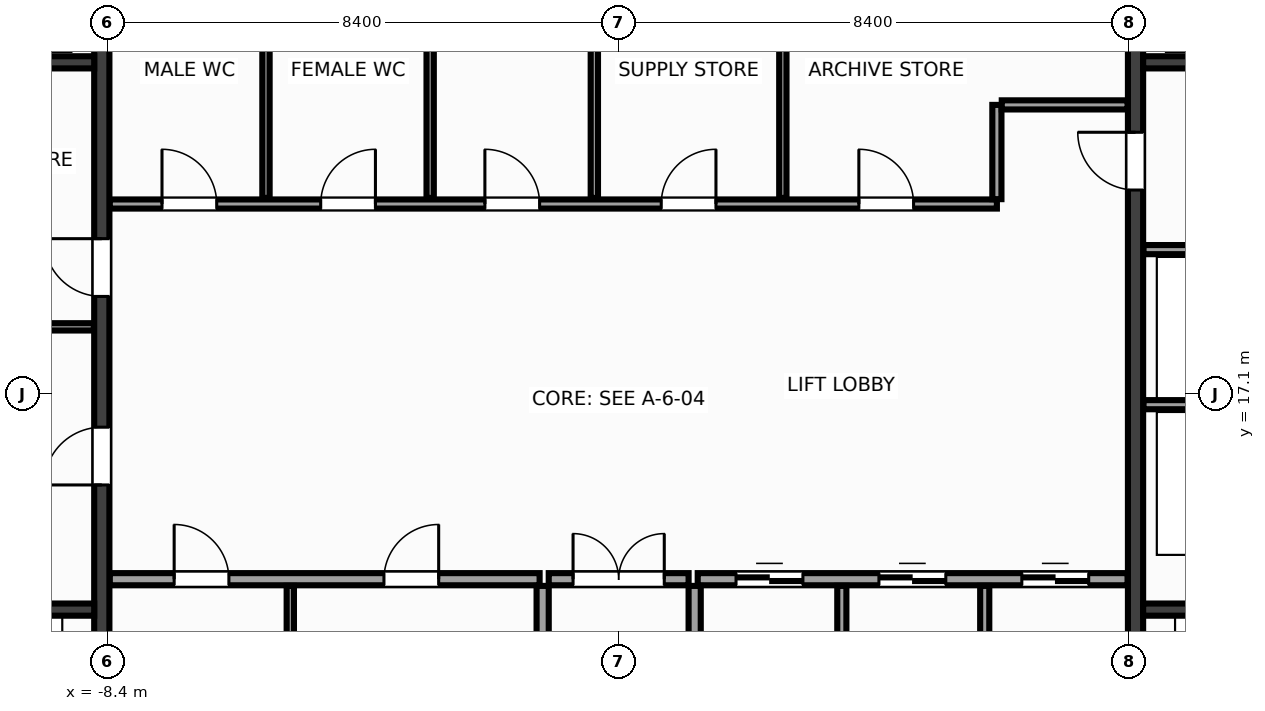
"""IFC4 building model, lengths in metres.
Left out: names, types, materials, properties, quantities, classifications, styles, units other than length and angle.
Written with IfcOpenShell. Run it as: python <this file> out.ifc"""

import sys

from ifc_helpers import new_model, si_unit, direction, frame, frame_2d, origin, place, context, subcontext, project, spatial, rectangle, extrude, source, transform, mapped, element, fill, save


model = new_model("IFC4")
c1 = context("Model", 3, precision=1e-05, world=origin(), true_north=direction((0.0, 1.0)))
c2 = subcontext(c1, "Body", "Model", "MODEL_VIEW")
j1 = project(units=[si_unit("LENGTHUNIT", "METRE"), si_unit("PLANEANGLEUNIT", "RADIAN")], contexts=[c1])
p1 = place(None, origin())
s1 = spatial("IfcSite", under=j1, at=p1, CompositionType="ELEMENT")
p2 = place(p1, origin())
s2 = spatial("IfcBuilding", under=s1, at=p2, CompositionType="ELEMENT")
p3 = place(p2, frame((0.0, 0.0, 95.6)))
s3 = spatial("IfcBuildingStorey", under=s2, at=p3, CompositionType="ELEMENT", Elevation=95.6)
m1 = source(origin(), c2, "Body", "SweptSolid", [
    extrude(rectangle(XDim=12.95, YDim=0.25, at=frame_2d((6.475, 0.0))), origin(), (0.0, 0.0, 1.0), 3.6),
])
p4 = place(p3, frame((-8.5, 10.525, 0.0), z_axis=(0.0, 0.0, 1.0), x_axis=(0.0, 1.0, 0.0)))
e1 = element("IfcWall", 1, at=p4, inside=s3, PredefinedType="SHEAR", context=c2, shape_type="MappedRepresentation", body=[
    mapped(m1, transform((0.0, 0.0, 0.0), x_axis=(1.0, 0.0, 0.0), y_axis=(0.0, 1.0, 0.0), z_axis=(0.0, 0.0, 1.0), scale=1.0)),
])
p5 = place(p4, frame((5.075, 0.0, 0.0)))
e2 = element("IfcOpeningElement", 2, at=p5, cuts=e1, PredefinedType="OPENING", context=c2, shape_type="SweptSolid", body=[
    extrude(rectangle(XDim=0.95, YDim=2.15, at=frame_2d((0.475, 1.075))), frame((0.0, 0.137, 0.0), z_axis=(0.0, -1.0, 0.0), x_axis=(1.0, 0.0, 0.0)), (0.0, 0.0, 1.0), 0.274),
])
p6 = place(p4, frame((8.175, 0.0, 0.0)))
e3 = element("IfcOpeningElement", 3, at=p6, cuts=e1, PredefinedType="OPENING", context=c2, shape_type="SweptSolid", body=[
    extrude(rectangle(XDim=0.95, YDim=2.15, at=frame_2d((0.475, 1.075))), frame((0.0, 0.137, 0.0), z_axis=(0.0, -1.0, 0.0), x_axis=(1.0, 0.0, 0.0)), (0.0, 0.0, 1.0), 0.274),
])
p7 = place(p3, frame((8.5, 10.525, 0.0), z_axis=(0.0, 0.0, 1.0), x_axis=(0.0, 1.0, 0.0)))
e4 = element("IfcWall", 4, at=p7, inside=s3, PredefinedType="SHEAR", context=c2, shape_type="MappedRepresentation", body=[
    mapped(m1, transform((0.0, 0.0, 0.0), x_axis=(1.0, 0.0, 0.0), y_axis=(0.0, 1.0, 0.0), z_axis=(0.0, 0.0, 1.0), scale=1.0)),
])
p8 = place(p7, frame((9.925, 0.0, 0.0)))
e5 = element("IfcOpeningElement", 5, at=p8, cuts=e4, PredefinedType="OPENING", context=c2, shape_type="SweptSolid", body=[
    extrude(rectangle(XDim=0.95, YDim=2.15, at=frame_2d((0.475, 1.075))), frame((0.0, 0.137, 0.0), z_axis=(0.0, -1.0, 0.0), x_axis=(1.0, 0.0, 0.0)), (0.0, 0.0, 1.0), 0.274),
])
m2 = source(origin(), c2, "Body", "SweptSolid", [
    extrude(rectangle(XDim=2.825, YDim=0.2, at=frame_2d((1.413, 0.0))), origin(), (0.0, 0.0, 1.0), 3.6),
])
for number, where, z_axis, x_axis in (
    (6, (-11.45, 13.55, 0.0), (0.0, 0.0, 1.0), (1.0, 0.0, 0.0)),
    (7, (8.625, 13.55, 0.0), (0.0, 0.0, 1.0), (1.0, 0.0, 0.0)),
):
    element("IfcWall", number, at=place(p3, frame(where, z_axis=z_axis, x_axis=x_axis)), inside=s3, PredefinedType="SHEAR", context=c2, shape_type="MappedRepresentation", body=[
        mapped(m2, transform((0.0, 0.0, 0.0), x_axis=(1.0, 0.0, 0.0), y_axis=(0.0, 1.0, 0.0), z_axis=(0.0, 0.0, 1.0), scale=1.0)),
    ])
m3 = source(origin(), c2, "Body", "SweptSolid", [
    extrude(rectangle(XDim=3.02, YDim=0.2, at=frame_2d((1.51, 0.0))), origin(), (0.0, 0.0, 1.0), 3.6),
])
for number, where, z_axis, x_axis in (
    (8, (-11.645, 22.55, 0.0), (0.0, 0.0, 1.0), (1.0, 0.0, 0.0)),
    (9, (8.625, 22.55, 0.0), (0.0, 0.0, 1.0), (1.0, 0.0, 0.0)),
):
    element("IfcWall", number, at=place(p3, frame(where, z_axis=z_axis, x_axis=x_axis)), inside=s3, PredefinedType="SHEAR", context=c2, shape_type="MappedRepresentation", body=[
        mapped(m3, transform((0.0, 0.0, 0.0), x_axis=(1.0, 0.0, 0.0), y_axis=(0.0, 1.0, 0.0), z_axis=(0.0, 0.0, 1.0), scale=1.0)),
    ])
m4 = source(origin(), c2, "Body", "SweptSolid", [
    extrude(rectangle(XDim=3.01, YDim=0.12, at=frame_2d((1.505, 0.0))), origin(), (0.0, 0.0, 1.0), 3.36),
])
p9 = place(p3, frame((-11.64, 18.2, 0.0), z_axis=(0.0, 0.0, 1.0), x_axis=(1.0, 0.0, 0.0)))
e10 = element("IfcWall", 10, at=p9, inside=s3, PredefinedType="PARTITIONING", context=c2, shape_type="MappedRepresentation", body=[
    mapped(m4, transform((0.0, 0.0, 0.0), x_axis=(1.0, 0.0, 0.0), y_axis=(0.0, 1.0, 0.0), z_axis=(0.0, 0.0, 1.0), scale=1.0)),
])
m5 = source(origin(), c2, "Body", "SweptSolid", [
    extrude(rectangle(XDim=3.01, YDim=0.15, at=frame_2d((1.505, 0.0))), origin(), (0.0, 0.0, 1.0), 3.36),
])
for number, where, z_axis, x_axis in (
    (11, (8.63, 16.92, 0.0), (0.0, 0.0, 1.0), (1.0, 0.0, 0.0)),
    (12, (8.63, 19.47, 0.0), (0.0, 0.0, 1.0), (1.0, 0.0, 0.0)),
):
    element("IfcWall", number, at=place(p3, frame(where, z_axis=z_axis, x_axis=x_axis)), inside=s3, PredefinedType="PARTITIONING", context=c2, shape_type="MappedRepresentation", body=[
        mapped(m5, transform((0.0, 0.0, 0.0), x_axis=(1.0, 0.0, 0.0), y_axis=(0.0, 1.0, 0.0), z_axis=(0.0, 0.0, 1.0), scale=1.0)),
    ])
m6 = source(origin(), c2, "Body", "SweptSolid", [
    extrude(rectangle(XDim=7.07, YDim=0.2, at=frame_2d((3.535, 0.0))), origin(), (0.0, 0.0, 1.0), 3.36),
])
p10 = place(p3, frame((-8.37, 14.05, 0.0), z_axis=(0.0, 0.0, 1.0), x_axis=(1.0, 0.0, 0.0)))
e13 = element("IfcWall", 13, at=p10, inside=s3, PredefinedType="PARTITIONING", context=c2, shape_type="MappedRepresentation", body=[
    mapped(m6, transform((0.0, 0.0, 0.0), x_axis=(1.0, 0.0, 0.0), y_axis=(0.0, 1.0, 0.0), z_axis=(0.0, 0.0, 1.0), scale=1.0)),
])
p11 = place(p10, frame((1.06, 0.0, 0.0)))
e14 = element("IfcOpeningElement", 14, at=p11, cuts=e13, PredefinedType="OPENING", context=c2, shape_type="SweptSolid", body=[
    extrude(rectangle(XDim=0.9, YDim=2.15, at=frame_2d((0.45, 1.075))), frame((0.0, 0.112, 0.0), z_axis=(0.0, -1.0, 0.0), x_axis=(1.0, 0.0, 0.0)), (0.0, 0.0, 1.0), 0.224),
])
p12 = place(p10, frame((4.51, 0.0, 0.0)))
e15 = element("IfcOpeningElement", 15, at=p12, cuts=e13, PredefinedType="OPENING", context=c2, shape_type="SweptSolid", body=[
    extrude(rectangle(XDim=0.9, YDim=2.15, at=frame_2d((0.45, 1.075))), frame((0.0, 0.112, 0.0), z_axis=(0.0, -1.0, 0.0), x_axis=(1.0, 0.0, 0.0)), (0.0, 0.0, 1.0), 0.224),
])
p13 = place(p3, frame((1.3, 14.05, 0.0), z_axis=(0.0, 0.0, 1.0), x_axis=(1.0, 0.0, 0.0)))
e16 = element("IfcWall", 16, at=p13, inside=s3, PredefinedType="PARTITIONING", context=c2, shape_type="MappedRepresentation", body=[
    mapped(m6, transform((0.0, 0.0, 0.0), x_axis=(1.0, 0.0, 0.0), y_axis=(0.0, 1.0, 0.0), z_axis=(0.0, 0.0, 1.0), scale=1.0)),
])
p14 = place(p13, frame((0.63, 0.0, 0.0)))
e17 = element("IfcOpeningElement", 17, at=p14, cuts=e16, PredefinedType="OPENING", context=c2, shape_type="SweptSolid", body=[
    extrude(rectangle(XDim=1.1, YDim=2.15, at=frame_2d((0.55, 1.075))), frame((0.0, 0.112, 0.0), z_axis=(0.0, -1.0, 0.0), x_axis=(1.0, 0.0, 0.0)), (0.0, 0.0, 1.0), 0.224),
])
p15 = place(p13, frame((2.98, 0.0, 0.0)))
e18 = element("IfcOpeningElement", 18, at=p15, cuts=e16, PredefinedType="OPENING", context=c2, shape_type="SweptSolid", body=[
    extrude(rectangle(XDim=1.1, YDim=2.15, at=frame_2d((0.55, 1.075))), frame((0.0, 0.112, 0.0), z_axis=(0.0, -1.0, 0.0), x_axis=(1.0, 0.0, 0.0)), (0.0, 0.0, 1.0), 0.224),
])
p16 = place(p13, frame((5.33, 0.0, 0.0)))
e19 = element("IfcOpeningElement", 19, at=p16, cuts=e16, PredefinedType="OPENING", context=c2, shape_type="SweptSolid", body=[
    extrude(rectangle(XDim=1.1, YDim=2.15, at=frame_2d((0.55, 1.075))), frame((0.0, 0.112, 0.0), z_axis=(0.0, -1.0, 0.0), x_axis=(1.0, 0.0, 0.0)), (0.0, 0.0, 1.0), 0.224),
])
m7 = source(origin(), c2, "Body", "SweptSolid", [
    extrude(rectangle(XDim=3.415, YDim=0.2, at=frame_2d((1.708, 0.0))), origin(), (0.0, 0.0, 1.0), 3.36),
])
for number, where, z_axis, x_axis in (
    (20, (-1.25, 10.525, 0.0), (0.0, 0.0, 1.0), (0.0, 1.0, 0.0)),
    (21, (1.25, 10.525, 0.0), (0.0, 0.0, 1.0), (0.0, 1.0, 0.0)),
):
    element("IfcWall", number, at=place(p3, frame(where, z_axis=z_axis, x_axis=x_axis)), inside=s3, PredefinedType="PARTITIONING", context=c2, shape_type="MappedRepresentation", body=[
        mapped(m7, transform((0.0, 0.0, 0.0), x_axis=(1.0, 0.0, 0.0), y_axis=(0.0, 1.0, 0.0), z_axis=(0.0, 0.0, 1.0), scale=1.0)),
    ])
m8 = source(origin(), c2, "Body", "SweptSolid", [
    extrude(rectangle(XDim=2.3, YDim=0.2, at=frame_2d((1.15, 0.0))), origin(), (0.0, 0.0, 1.0), 3.36),
])
p17 = place(p3, frame((-1.15, 14.05, 0.0), z_axis=(0.0, 0.0, 1.0), x_axis=(1.0, 0.0, 0.0)))
e22 = element("IfcWall", 22, at=p17, inside=s3, PredefinedType="PARTITIONING", context=c2, shape_type="MappedRepresentation", body=[
    mapped(m8, transform((0.0, 0.0, 0.0), x_axis=(1.0, 0.0, 0.0), y_axis=(0.0, 1.0, 0.0), z_axis=(0.0, 0.0, 1.0), scale=1.0)),
])
p18 = place(p17, frame((0.4, 0.0, 0.0)))
e23 = element("IfcOpeningElement", 23, at=p18, cuts=e22, PredefinedType="OPENING", context=c2, shape_type="SweptSolid", body=[
    extrude(rectangle(XDim=1.5, YDim=2.2, at=frame_2d((0.75, 1.1))), frame((0.0, 0.112, 0.0), z_axis=(0.0, -1.0, 0.0), x_axis=(1.0, 0.0, 0.0)), (0.0, 0.0, 1.0), 0.224),
])
m9 = source(origin(), c2, "Body", "SweptSolid", [
    extrude(rectangle(XDim=14.59, YDim=0.15, at=frame_2d((7.295, 0.0))), origin(), (0.0, 0.0, 1.0), 3.36),
])
p19 = place(p3, frame((-8.37, 20.22, 0.0), z_axis=(0.0, 0.0, 1.0), x_axis=(1.0, 0.0, 0.0)))
e24 = element("IfcWall", 24, at=p19, inside=s3, PredefinedType="PARTITIONING", context=c2, shape_type="MappedRepresentation", body=[
    mapped(m9, transform((0.0, 0.0, 0.0), x_axis=(1.0, 0.0, 0.0), y_axis=(0.0, 1.0, 0.0), z_axis=(0.0, 0.0, 1.0), scale=1.0)),
])
p20 = place(p19, frame((0.86, 0.0, 0.0)))
e25 = element("IfcOpeningElement", 25, at=p20, cuts=e24, PredefinedType="OPENING", context=c2, shape_type="SweptSolid", body=[
    extrude(rectangle(XDim=0.9, YDim=2.15, at=frame_2d((0.45, 1.075))), frame((0.0, 0.087, 0.0), z_axis=(0.0, -1.0, 0.0), x_axis=(1.0, 0.0, 0.0)), (0.0, 0.0, 1.0), 0.174),
])
p21 = place(p19, frame((3.47, 0.0, 0.0)))
e26 = element("IfcOpeningElement", 26, at=p21, cuts=e24, PredefinedType="OPENING", context=c2, shape_type="SweptSolid", body=[
    extrude(rectangle(XDim=0.9, YDim=2.15, at=frame_2d((0.45, 1.075))), frame((0.0, 0.087, 0.0), z_axis=(0.0, -1.0, 0.0), x_axis=(1.0, 0.0, 0.0)), (0.0, 0.0, 1.0), 0.174),
])
p22 = place(p19, frame((6.17, 0.0, 0.0)))
e27 = element("IfcOpeningElement", 27, at=p22, cuts=e24, PredefinedType="OPENING", context=c2, shape_type="SweptSolid", body=[
    extrude(rectangle(XDim=0.9, YDim=2.15, at=frame_2d((0.45, 1.075))), frame((0.0, 0.087, 0.0), z_axis=(0.0, -1.0, 0.0), x_axis=(1.0, 0.0, 0.0)), (0.0, 0.0, 1.0), 0.174),
])
p23 = place(p19, frame((9.07, 0.0, 0.0)))
e28 = element("IfcOpeningElement", 28, at=p23, cuts=e24, PredefinedType="OPENING", context=c2, shape_type="SweptSolid", body=[
    extrude(rectangle(XDim=0.9, YDim=2.15, at=frame_2d((0.45, 1.075))), frame((0.0, 0.087, 0.0), z_axis=(0.0, -1.0, 0.0), x_axis=(1.0, 0.0, 0.0)), (0.0, 0.0, 1.0), 0.174),
])
p24 = place(p19, frame((12.32, 0.0, 0.0)))
e29 = element("IfcOpeningElement", 29, at=p24, cuts=e24, PredefinedType="OPENING", context=c2, shape_type="SweptSolid", body=[
    extrude(rectangle(XDim=0.9, YDim=2.15, at=frame_2d((0.45, 1.075))), frame((0.0, 0.087, 0.0), z_axis=(0.0, -1.0, 0.0), x_axis=(1.0, 0.0, 0.0)), (0.0, 0.0, 1.0), 0.174),
])
m10 = source(origin(), c2, "Body", "SweptSolid", [
    extrude(rectangle(XDim=1.55, YDim=0.15, at=frame_2d((0.775, 0.0))), origin(), (0.0, 0.0, 1.0), 3.36),
])
p25 = place(p3, frame((6.22, 20.3, 0.0), z_axis=(0.0, 0.0, 1.0), x_axis=(0.0, 1.0, 0.0)))
e30 = element("IfcWall", 30, at=p25, inside=s3, PredefinedType="PARTITIONING", context=c2, shape_type="MappedRepresentation", body=[
    mapped(m10, transform((0.0, 0.0, 0.0), x_axis=(1.0, 0.0, 0.0), y_axis=(0.0, 1.0, 0.0), z_axis=(0.0, 0.0, 1.0), scale=1.0)),
])
m11 = source(origin(), c2, "Body", "SweptSolid", [
    extrude(rectangle(XDim=2.07, YDim=0.15, at=frame_2d((1.035, 0.0))), origin(), (0.0, 0.0, 1.0), 3.36),
])
p26 = place(p3, frame((6.3, 21.85, 0.0), z_axis=(0.0, 0.0, 1.0), x_axis=(1.0, 0.0, 0.0)))
e31 = element("IfcWall", 31, at=p26, inside=s3, PredefinedType="PARTITIONING", context=c2, shape_type="MappedRepresentation", body=[
    mapped(m11, transform((0.0, 0.0, 0.0), x_axis=(1.0, 0.0, 0.0), y_axis=(0.0, 1.0, 0.0), z_axis=(0.0, 0.0, 1.0), scale=1.0)),
])
m12 = source(origin(), c2, "Body", "SweptSolid", [
    extrude(rectangle(XDim=3.415, YDim=0.12, at=frame_2d((1.708, 0.0))), origin(), (0.0, 0.0, 1.0), 3.36),
])
p27 = place(p3, frame((-5.4, 10.525, 0.0), z_axis=(0.0, 0.0, 1.0), x_axis=(0.0, 1.0, 0.0)))
e32 = element("IfcWall", 32, at=p27, inside=s3, PredefinedType="PARTITIONING", context=c2, shape_type="MappedRepresentation", body=[
    mapped(m12, transform((0.0, 0.0, 0.0), x_axis=(1.0, 0.0, 0.0), y_axis=(0.0, 1.0, 0.0), z_axis=(0.0, 0.0, 1.0), scale=1.0)),
])
m13 = source(origin(), c2, "Body", "SweptSolid", [
    extrude(rectangle(XDim=3.415, YDim=0.15, at=frame_2d((1.708, 0.0))), origin(), (0.0, 0.0, 1.0), 3.36),
])
for number, where, z_axis, x_axis in (
    (33, (3.67, 10.525, 0.0), (0.0, 0.0, 1.0), (0.0, 1.0, 0.0)),
    (34, (6.02, 10.525, 0.0), (0.0, 0.0, 1.0), (0.0, 1.0, 0.0)),
):
    element("IfcWall", number, at=place(p3, frame(where, z_axis=z_axis, x_axis=x_axis)), inside=s3, PredefinedType="PARTITIONING", context=c2, shape_type="MappedRepresentation", body=[
        mapped(m13, transform((0.0, 0.0, 0.0), x_axis=(1.0, 0.0, 0.0), y_axis=(0.0, 1.0, 0.0), z_axis=(0.0, 0.0, 1.0), scale=1.0)),
    ])
m14 = source(origin(), c2, "Body", "SweptSolid", [
    extrude(rectangle(XDim=3.115, YDim=0.12, at=frame_2d((1.558, 0.0))), origin(), (0.0, 0.0, 1.0), 3.36),
])
for number, where, z_axis, x_axis in (
    (35, (-5.8, 20.32, 0.0), (0.0, 0.0, 1.0), (0.0, 1.0, 0.0)),
    (36, (-3.1, 20.32, 0.0), (0.0, 0.0, 1.0), (0.0, 1.0, 0.0)),
    (37, (-0.4, 20.32, 0.0), (0.0, 0.0, 1.0), (0.0, 1.0, 0.0)),
    (38, (2.7, 20.32, 0.0), (0.0, 0.0, 1.0), (0.0, 1.0, 0.0)),
):
    element("IfcWall", number, at=place(p3, frame(where, z_axis=z_axis, x_axis=x_axis)), inside=s3, PredefinedType="PARTITIONING", context=c2, shape_type="MappedRepresentation", body=[
        mapped(m14, transform((0.0, 0.0, 0.0), x_axis=(1.0, 0.0, 0.0), y_axis=(0.0, 1.0, 0.0), z_axis=(0.0, 0.0, 1.0), scale=1.0)),
    ])
m15 = source(origin(), c2, "Body", "SweptSolid", [
    extrude(rectangle(XDim=0.95, YDim=2.15, at=frame_2d((0.475, 1.075))), frame((0.0, 0.025, 0.0), z_axis=(0.0, -1.0, 0.0), x_axis=(1.0, 0.0, 0.0)), (0.0, 0.0, 1.0), 0.05),
])
p28 = place(p5, origin())
e39 = element("IfcDoor", 39, at=p28, inside=s3, OperationType="SINGLE_SWING_LEFT", PredefinedType="DOOR", context=c2, shape_type="MappedRepresentation", body=[
    mapped(m15, transform((0.0, 0.0, 0.0), x_axis=(1.0, 0.0, 0.0), y_axis=(0.0, 1.0, 0.0), z_axis=(0.0, 0.0, 1.0), scale=1.0)),
])
fill(e2, e39)
p29 = place(p6, origin())
e40 = element("IfcDoor", 40, at=p29, inside=s3, OperationType="SINGLE_SWING_RIGHT", PredefinedType="DOOR", context=c2, shape_type="MappedRepresentation", body=[
    mapped(m15, transform((0.0, 0.0, 0.0), x_axis=(1.0, 0.0, 0.0), y_axis=(0.0, 1.0, 0.0), z_axis=(0.0, 0.0, 1.0), scale=1.0)),
])
fill(e3, e40)
m16 = source(origin(), c2, "Body", "SweptSolid", [
    extrude(rectangle(XDim=0.95, YDim=2.15, at=frame_2d((0.475, 1.075))), frame((0.0, 0.025, 0.0), z_axis=(0.0, -1.0, 0.0), x_axis=(1.0, 0.0, 0.0)), (0.0, 0.0, 1.0), 0.05),
])
p30 = place(p8, origin())
e41 = element("IfcDoor", 41, at=p30, inside=s3, OperationType="SINGLE_SWING_RIGHT", PredefinedType="DOOR", context=c2, shape_type="MappedRepresentation", body=[
    mapped(m16, transform((0.0, 0.0, 0.0), x_axis=(1.0, 0.0, 0.0), y_axis=(0.0, 1.0, 0.0), z_axis=(0.0, 0.0, 1.0), scale=1.0)),
])
fill(e5, e41)
m17 = source(origin(), c2, "Body", "SweptSolid", [
    extrude(rectangle(XDim=0.9, YDim=2.15, at=frame_2d((0.45, 1.075))), frame((0.0, 0.025, 0.0), z_axis=(0.0, -1.0, 0.0), x_axis=(1.0, 0.0, 0.0)), (0.0, 0.0, 1.0), 0.05),
])
p31 = place(p11, origin())
e42 = element("IfcDoor", 42, at=p31, inside=s3, OperationType="SINGLE_SWING_LEFT", PredefinedType="DOOR", context=c2, shape_type="MappedRepresentation", body=[
    mapped(m17, transform((0.0, 0.0, 0.0), x_axis=(1.0, 0.0, 0.0), y_axis=(0.0, 1.0, 0.0), z_axis=(0.0, 0.0, 1.0), scale=1.0)),
])
fill(e14, e42)
p32 = place(p12, origin())
e43 = element("IfcDoor", 43, at=p32, inside=s3, OperationType="SINGLE_SWING_RIGHT", PredefinedType="DOOR", context=c2, shape_type="MappedRepresentation", body=[
    mapped(m17, transform((0.0, 0.0, 0.0), x_axis=(1.0, 0.0, 0.0), y_axis=(0.0, 1.0, 0.0), z_axis=(0.0, 0.0, 1.0), scale=1.0)),
])
fill(e15, e43)
m18 = source(origin(), c2, "Body", "SweptSolid", [
    extrude(rectangle(XDim=1.1, YDim=2.15, at=frame_2d((0.55, 1.075))), frame((0.0, 0.025, 0.0), z_axis=(0.0, -1.0, 0.0), x_axis=(1.0, 0.0, 0.0)), (0.0, 0.0, 1.0), 0.05),
])
p33 = place(p14, origin())
e44 = element("IfcDoor", 44, at=p33, inside=s3, OperationType="DOUBLE_DOOR_SLIDING", PredefinedType="DOOR", context=c2, shape_type="MappedRepresentation", body=[
    mapped(m18, transform((0.0, 0.0, 0.0), x_axis=(1.0, 0.0, 0.0), y_axis=(0.0, 1.0, 0.0), z_axis=(0.0, 0.0, 1.0), scale=1.0)),
])
fill(e17, e44)
p34 = place(p15, origin())
e45 = element("IfcDoor", 45, at=p34, inside=s3, OperationType="DOUBLE_DOOR_SLIDING", PredefinedType="DOOR", context=c2, shape_type="MappedRepresentation", body=[
    mapped(m18, transform((0.0, 0.0, 0.0), x_axis=(1.0, 0.0, 0.0), y_axis=(0.0, 1.0, 0.0), z_axis=(0.0, 0.0, 1.0), scale=1.0)),
])
fill(e18, e45)
p35 = place(p16, origin())
e46 = element("IfcDoor", 46, at=p35, inside=s3, OperationType="DOUBLE_DOOR_SLIDING", PredefinedType="DOOR", context=c2, shape_type="MappedRepresentation", body=[
    mapped(m18, transform((0.0, 0.0, 0.0), x_axis=(1.0, 0.0, 0.0), y_axis=(0.0, 1.0, 0.0), z_axis=(0.0, 0.0, 1.0), scale=1.0)),
])
fill(e19, e46)
m19 = source(origin(), c2, "Body", "SweptSolid", [
    extrude(rectangle(XDim=1.5, YDim=2.2, at=frame_2d((0.75, 1.1))), frame((0.0, 0.025, 0.0), z_axis=(0.0, -1.0, 0.0), x_axis=(1.0, 0.0, 0.0)), (0.0, 0.0, 1.0), 0.05),
])
p36 = place(p18, origin())
e47 = element("IfcDoor", 47, at=p36, inside=s3, OperationType="DOUBLE_DOOR_SINGLE_SWING", PredefinedType="DOOR", context=c2, shape_type="MappedRepresentation", body=[
    mapped(m19, transform((0.0, 0.0, 0.0), x_axis=(1.0, 0.0, 0.0), y_axis=(0.0, 1.0, 0.0), z_axis=(0.0, 0.0, 1.0), scale=1.0)),
])
fill(e23, e47)
p37 = place(p20, origin())
e48 = element("IfcDoor", 48, at=p37, inside=s3, OperationType="SINGLE_SWING_LEFT", PredefinedType="DOOR", context=c2, shape_type="MappedRepresentation", body=[
    mapped(m17, transform((0.0, 0.0, 0.0), x_axis=(1.0, 0.0, 0.0), y_axis=(0.0, 1.0, 0.0), z_axis=(0.0, 0.0, 1.0), scale=1.0)),
])
fill(e25, e48)
p38 = place(p21, origin())
e49 = element("IfcDoor", 49, at=p38, inside=s3, OperationType="SINGLE_SWING_RIGHT", PredefinedType="DOOR", context=c2, shape_type="MappedRepresentation", body=[
    mapped(m17, transform((0.0, 0.0, 0.0), x_axis=(1.0, 0.0, 0.0), y_axis=(0.0, 1.0, 0.0), z_axis=(0.0, 0.0, 1.0), scale=1.0)),
])
fill(e26, e49)
p39 = place(p22, origin())
e50 = element("IfcDoor", 50, at=p39, inside=s3, OperationType="SINGLE_SWING_LEFT", PredefinedType="DOOR", context=c2, shape_type="MappedRepresentation", body=[
    mapped(m17, transform((0.0, 0.0, 0.0), x_axis=(1.0, 0.0, 0.0), y_axis=(0.0, 1.0, 0.0), z_axis=(0.0, 0.0, 1.0), scale=1.0)),
])
fill(e27, e50)
p40 = place(p23, origin())
e51 = element("IfcDoor", 51, at=p40, inside=s3, OperationType="SINGLE_SWING_RIGHT", PredefinedType="DOOR", context=c2, shape_type="MappedRepresentation", body=[
    mapped(m17, transform((0.0, 0.0, 0.0), x_axis=(1.0, 0.0, 0.0), y_axis=(0.0, 1.0, 0.0), z_axis=(0.0, 0.0, 1.0), scale=1.0)),
])
fill(e28, e51)
p41 = place(p24, origin())
e52 = element("IfcDoor", 52, at=p41, inside=s3, OperationType="SINGLE_SWING_LEFT", PredefinedType="DOOR", context=c2, shape_type="MappedRepresentation", body=[
    mapped(m17, transform((0.0, 0.0, 0.0), x_axis=(1.0, 0.0, 0.0), y_axis=(0.0, 1.0, 0.0), z_axis=(0.0, 0.0, 1.0), scale=1.0)),
])
fill(e29, e52)
save(model, sys.argv[1])
